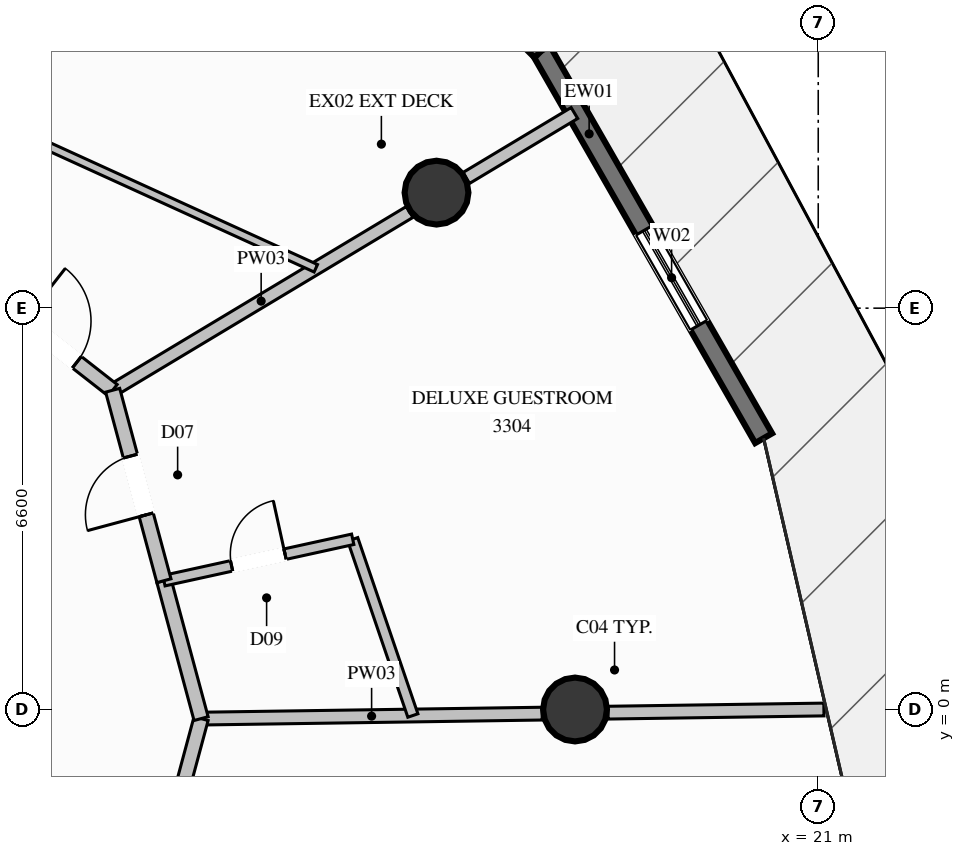
"""IFC4 building model, lengths in metres.
Left out: names, types, materials, properties, quantities, classifications, styles, units other than length and angle.
Written with IfcOpenShell. Run it as: python <this file> out.ifc"""

import sys

from ifc_helpers import new_model, si_unit, direction, frame, frame_2d, origin, origin_2d, place, context, subcontext, project, spatial, rectangle, circle, extrude, element, fill, save


model = new_model("IFC4")
c1 = context("Model", 3, precision=1e-05, world=origin(), true_north=direction((0.0, 1.0)))
c2 = subcontext(c1, "Body", "Model", "MODEL_VIEW")
j1 = project(units=[si_unit("LENGTHUNIT", "METRE"), si_unit("PLANEANGLEUNIT", "RADIAN")], contexts=[c1])
p1 = place(None, origin())
s1 = spatial("IfcSite", under=j1, at=p1, CompositionType="ELEMENT")
p2 = place(p1, origin())
s2 = spatial("IfcBuilding", under=s1, at=p2, CompositionType="ELEMENT")
p3 = place(p2, frame((0.0, 0.0, 124.2)))
s3 = spatial("IfcBuildingStorey", under=s2, at=p3, CompositionType="ELEMENT", Elevation=124.2)
for number, where, z_axis, x_axis in (
    (1, (17.0, 0.0, 0.0), (0.0, 0.0, 1.0), (1.0, 0.0, 0.0)),
    (2, (14.722, 8.5, 0.0), (0.0, 0.0, 1.0), (1.0, 0.0, 0.0)),
):
    element("IfcColumn", number, at=place(p3, frame(where, z_axis=z_axis, x_axis=x_axis)), inside=s3, PredefinedType="COLUMN", context=c2, shape_type="SweptSolid", body=[
        extrude(circle(Radius=0.525, at=origin_2d()), origin(), (0.0, 0.0, 1.0), 3.6),
    ])
p4 = place(p3, frame((16.448, 10.834, 0.0), z_axis=(0.0, 0.0, 1.0), x_axis=(0.497401787227, -0.8675202949, 0.0)))
e3 = element("IfcWall", 3, at=p4, inside=s3, PredefinedType="SOLIDWALL", context=c2, shape_type="SweptSolid", body=[
    extrude(rectangle(XDim=7.346, YDim=0.32, at=frame_2d((3.673, 0.0))), origin(), (0.0, 0.0, 1.0), 3.35),
])
p5 = place(p4, frame((3.403, 0.0, 0.35)))
e4 = element("IfcOpeningElement", 4, at=p5, cuts=e3, PredefinedType="OPENING", context=c2, shape_type="SweptSolid", body=[
    extrude(rectangle(XDim=1.8, YDim=2.6, at=frame_2d((0.9, 1.3))), frame((0.0, 0.17, 0.0), z_axis=(0.0, -1.0, 0.0), x_axis=(1.0, 0.0, 0.0)), (0.0, 0.0, 1.0), 0.34),
])
p6 = place(p3, frame((11.071, 16.147, 0.0), z_axis=(0.0, 0.0, 1.0), x_axis=(0.711325125038, -0.702863120735, 0.0)))
e5 = element("IfcWall", 5, at=p6, inside=s3, PredefinedType="SOLIDWALL", context=c2, shape_type="SweptSolid", body=[
    extrude(rectangle(XDim=7.559, YDim=0.32, at=frame_2d((3.78, 0.0))), origin(), (0.0, 0.0, 1.0), 3.35),
])
p7 = place(p6, frame((0.69, 0.0, 0.35)))
e6 = element("IfcOpeningElement", 6, at=p7, cuts=e5, PredefinedType="OPENING", context=c2, shape_type="SweptSolid", body=[
    extrude(rectangle(XDim=1.8, YDim=2.6, at=frame_2d((0.9, 1.3))), frame((0.0, 0.17, 0.0), z_axis=(0.0, -1.0, 0.0), x_axis=(1.0, 0.0, 0.0)), (0.0, 0.0, 1.0), 0.34),
])
p8 = place(p6, frame((3.23, 0.0, 0.0)))
e7 = element("IfcOpeningElement", 7, at=p8, cuts=e5, PredefinedType="OPENING", context=c2, shape_type="SweptSolid", body=[
    extrude(rectangle(XDim=1.1, YDim=2.2, at=frame_2d((0.55, 1.1))), frame((0.0, 0.17, 0.0), z_axis=(0.0, -1.0, 0.0), x_axis=(1.0, 0.0, 0.0)), (0.0, 0.0, 1.0), 0.34),
])
p9 = place(p3, frame((10.85, -0.15, 0.0), z_axis=(0.0, 0.0, 1.0), x_axis=(0.999893703948, 0.014580151076, 0.0)))
e8 = element("IfcWall", 8, at=p9, inside=s3, PredefinedType="PARTITIONING", context=c2, shape_type="SweptSolid", body=[
    extrude(rectangle(XDim=5.609, YDim=0.21, at=frame_2d((2.805, 0.0))), origin(), (0.0, 0.0, 1.0), 3.35),
])
p10 = place(p3, frame((17.543, -0.052, 0.0), z_axis=(0.0, 0.0, 1.0), x_axis=(0.999892731853, 0.014646664733, 0.0)))
e9 = element("IfcWall", 9, at=p10, inside=s3, PredefinedType="PARTITIONING", context=c2, shape_type="SweptSolid", body=[
    extrude(rectangle(XDim=3.551, YDim=0.21, at=frame_2d((1.775, 0.0))), origin(), (0.0, 0.0, 1.0), 3.35),
])
p11 = place(p3, frame((9.396, 5.25, 0.0), z_axis=(0.0, 0.0, 1.0), x_axis=(0.857379456535, 0.514684823471, 0.0)))
e10 = element("IfcWall", 10, at=p11, inside=s3, PredefinedType="PARTITIONING", context=c2, shape_type="SweptSolid", body=[
    extrude(rectangle(XDim=5.697, YDim=0.21, at=frame_2d((2.848, 0.0))), origin(), (0.0, 0.0, 1.0), 2.791),
])
p12 = place(p3, frame((15.211, 8.741, 0.0), z_axis=(0.0, 0.0, 1.0), x_axis=(0.857347553721, 0.51473796453, 0.0)))
e11 = element("IfcWall", 11, at=p12, inside=s3, PredefinedType="PARTITIONING", context=c2, shape_type="SweptSolid", body=[
    extrude(rectangle(XDim=2.075, YDim=0.21, at=frame_2d((1.038, 0.0))), origin(), (0.0, 0.0, 1.0), 3.35),
])
p13 = place(p3, frame((7.35, 6.85, 0.0), z_axis=(0.0, 0.0, 1.0), x_axis=(0.7876993483, -0.6160598483, 0.0)))
e12 = element("IfcWall", 12, at=p13, inside=s3, PredefinedType="PARTITIONING", context=c2, shape_type="SweptSolid", body=[
    extrude(rectangle(XDim=2.597, YDim=0.24, at=frame_2d((1.299, 0.0))), origin(), (0.0, 0.0, 1.0), 3.35),
])
p14 = place(p13, frame((0.749, 0.0, 0.0)))
e13 = element("IfcOpeningElement", 13, at=p14, cuts=e12, PredefinedType="OPENING", context=c2, shape_type="SweptSolid", body=[
    extrude(rectangle(XDim=1.1, YDim=2.3, at=frame_2d((0.55, 1.15))), frame((0.0, 0.13, 0.0), z_axis=(0.0, -1.0, 0.0), x_axis=(1.0, 0.0, 0.0)), (0.0, 0.0, 1.0), 0.26),
])
p15 = place(p3, frame((0.0, 13.061, 0.0), z_axis=(0.0, 0.0, 1.0), x_axis=(0.909952678095, -0.414712097277, 0.0)))
e14 = element("IfcWall", 14, at=p15, inside=s3, PredefinedType="PARTITIONING", context=c2, shape_type="SweptSolid", body=[
    extrude(rectangle(XDim=13.998, YDim=0.135, at=frame_2d((6.999, 0.0))), origin(), (0.0, 0.0, 1.0), 3.35),
])
p16 = place(p15, frame((6.524, 0.0, 0.0)))
e15 = element("IfcOpeningElement", 15, at=p16, cuts=e14, PredefinedType="OPENING", context=c2, shape_type="SweptSolid", body=[
    extrude(rectangle(XDim=0.95, YDim=2.1, at=frame_2d((0.475, 1.05))), frame((0.0, 0.078, 0.0), z_axis=(0.0, -1.0, 0.0), x_axis=(1.0, 0.0, 0.0)), (0.0, 0.0, 1.0), 0.155),
])
p17 = place(p3, frame((10.007, -3.282, 0.0), z_axis=(0.0, 0.0, 1.0), x_axis=(0.259905989708, 0.965633924691, 0.0)))
e16 = element("IfcWall", 16, at=p17, inside=s3, PredefinedType="PARTITIONING", context=c2, shape_type="SweptSolid", body=[
    extrude(rectangle(XDim=3.244, YDim=0.24, at=frame_2d((1.622, 0.0))), origin(), (0.0, 0.0, 1.0), 2.985),
])
p18 = place(p17, frame((1.122, 0.0, 0.0)))
e17 = element("IfcOpeningElement", 17, at=p18, cuts=e16, PredefinedType="OPENING", context=c2, shape_type="SweptSolid", body=[
    extrude(rectangle(XDim=1.0, YDim=2.2, at=frame_2d((0.5, 1.1))), frame((0.0, 0.13, 0.0), z_axis=(0.0, -1.0, 0.0), x_axis=(1.0, 0.0, 0.0)), (0.0, 0.0, 1.0), 0.26),
])
p19 = place(p3, frame((10.85, -0.15, 0.0), z_axis=(0.0, 0.0, 1.0), x_axis=(-0.260178493416, 0.965560537493, 0.0)))
e18 = element("IfcWall", 18, at=p19, inside=s3, PredefinedType="PARTITIONING", context=c2, shape_type="SweptSolid", body=[
    extrude(rectangle(XDim=2.349, YDim=0.24, at=frame_2d((1.174, 0.0))), origin(), (0.0, 0.0, 1.0), 2.985),
])
p20 = place(p3, frame((14.333, -0.099, 0.0), z_axis=(0.0, 0.0, 1.0), x_axis=(-0.322964477687, 0.946411087294, 0.0)))
e19 = element("IfcWall", 19, at=p20, inside=s3, PredefinedType="PLUMBINGWALL", context=c2, shape_type="SweptSolid", body=[
    extrude(rectangle(XDim=3.062, YDim=0.175, at=frame_2d((1.531, 0.0))), origin(), (0.0, 0.0, 1.0), 3.35),
])
p21 = place(p3, frame((10.239, 2.118, 0.0), z_axis=(0.0, 0.0, 1.0), x_axis=(0.976772579837, 0.214278620675, 0.0)))
e20 = element("IfcWall", 20, at=p21, inside=s3, PredefinedType="PLUMBINGWALL", context=c2, shape_type="SweptSolid", body=[
    extrude(rectangle(XDim=3.179, YDim=0.175, at=frame_2d((1.589, 0.0))), origin(), (0.0, 0.0, 1.0), 3.35),
])
p22 = place(p21, frame((1.139, 0.0, 0.0)))
e21 = element("IfcOpeningElement", 21, at=p22, cuts=e20, PredefinedType="OPENING", context=c2, shape_type="SweptSolid", body=[
    extrude(rectangle(XDim=0.9, YDim=2.1, at=frame_2d((0.45, 1.05))), frame((0.0, 0.098, 0.0), z_axis=(0.0, -1.0, 0.0), x_axis=(1.0, 0.0, 0.0)), (0.0, 0.0, 1.0), 0.195),
])
p23 = place(p3, frame((10.239, 2.118, 0.0), z_axis=(0.0, 0.0, 1.0), x_axis=(-0.259905989708, 0.965633924691, 0.0)))
e22 = element("IfcWall", 22, at=p23, inside=s3, PredefinedType="PARTITIONING", context=c2, shape_type="SweptSolid", body=[
    extrude(rectangle(XDim=3.244, YDim=0.24, at=frame_2d((1.622, 0.0))), origin(), (0.0, 0.0, 1.0), 3.35),
])
p24 = place(p23, frame((1.122, 0.0, 0.0)))
e23 = element("IfcOpeningElement", 23, at=p24, cuts=e22, PredefinedType="OPENING", context=c2, shape_type="SweptSolid", body=[
    extrude(rectangle(XDim=1.0, YDim=2.2, at=frame_2d((0.5, 1.1))), frame((0.0, 0.13, 0.0), z_axis=(0.0, -1.0, 0.0), x_axis=(1.0, 0.0, 0.0)), (0.0, 0.0, 1.0), 0.26),
])
p25 = place(p5, origin())
e24 = element("IfcWindow", 24, at=p25, inside=s3, PartitioningType="SINGLE_PANEL", PredefinedType="WINDOW", context=c2, shape_type="SweptSolid", body=[
    extrude(rectangle(XDim=1.8, YDim=2.6, at=frame_2d((0.9, 1.3))), frame((0.0, 0.03, 0.0), z_axis=(0.0, -1.0, 0.0), x_axis=(1.0, 0.0, 0.0)), (0.0, 0.0, 1.0), 0.06),
])
fill(e4, e24)
p26 = place(p14, origin())
e25 = element("IfcDoor", 25, at=p26, inside=s3, OperationType="SINGLE_SWING_LEFT", PredefinedType="DOOR", context=c2, shape_type="SweptSolid", body=[
    extrude(rectangle(XDim=1.1, YDim=2.3, at=frame_2d((0.55, 1.15))), frame((0.0, 0.025, 0.0), z_axis=(0.0, -1.0, 0.0), x_axis=(1.0, 0.0, 0.0)), (0.0, 0.0, 1.0), 0.05),
])
fill(e13, e25)
p27 = place(p22, origin())
e26 = element("IfcDoor", 26, at=p27, inside=s3, OperationType="SINGLE_SWING_RIGHT", PredefinedType="DOOR", context=c2, shape_type="SweptSolid", body=[
    extrude(rectangle(XDim=0.9, YDim=2.1, at=frame_2d((0.45, 1.05))), frame((0.0, 0.025, 0.0), z_axis=(0.0, -1.0, 0.0), x_axis=(1.0, 0.0, 0.0)), (0.0, 0.0, 1.0), 0.05),
])
fill(e21, e26)
p28 = place(p24, origin())
e27 = element("IfcDoor", 27, at=p28, inside=s3, OperationType="SINGLE_SWING_LEFT", PredefinedType="DOOR", context=c2, shape_type="SweptSolid", body=[
    extrude(rectangle(XDim=1.0, YDim=2.2, at=frame_2d((0.5, 1.1))), frame((0.0, 0.025, 0.0), z_axis=(0.0, -1.0, 0.0), x_axis=(1.0, 0.0, 0.0)), (0.0, 0.0, 1.0), 0.05),
])
fill(e23, e27)
save(model, sys.argv[1])
